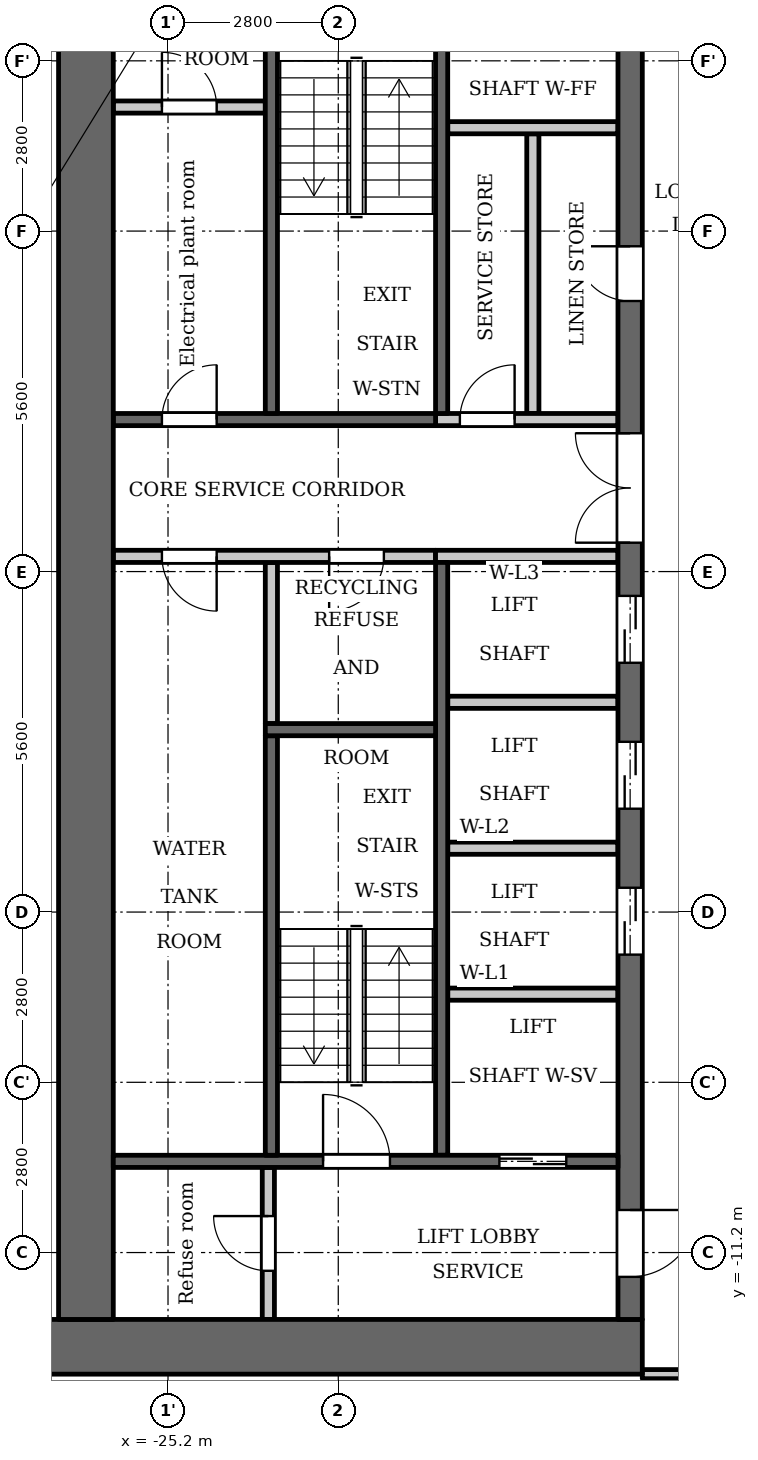
"""IFC4 building model, lengths in metres.
Left out: names, types, materials, properties, quantities, classifications, styles, units other than length and angle.
Written with IfcOpenShell. Run it as: python <this file> out.ifc"""

import sys

from ifc_helpers import new_model, si_unit, direction, frame, frame_2d, origin, place, context, subcontext, project, spatial, rectangle, extrude, element, fill, save


model = new_model("IFC4")
c1 = context("Model", 3, precision=1e-05, world=origin(), true_north=direction((0.0, 1.0)))
c2 = subcontext(c1, "Body", "Model", "MODEL_VIEW")
j1 = project(units=[si_unit("LENGTHUNIT", "METRE"), si_unit("PLANEANGLEUNIT", "RADIAN")], contexts=[c1])
p1 = place(None, origin())
s1 = spatial("IfcSite", under=j1, at=p1, CompositionType="ELEMENT")
p2 = place(p1, origin())
s2 = spatial("IfcBuilding", under=s1, at=p2, CompositionType="ELEMENT")
p3 = place(p2, frame((0.0, 0.0, 65.5)))
s3 = spatial("IfcBuildingStorey", under=s2, at=p3, CompositionType="ELEMENT", Elevation=65.5)
p4 = place(p3, frame((-23.5, -2.5, 0.0), z_axis=(0.0, 0.0, 1.0), x_axis=(0.0, 1.0, 0.0)))
e1 = element("IfcWall", 1, at=p4, inside=s3, PredefinedType="PARTITIONING", context=c2, shape_type="SweptSolid", body=[
    extrude(rectangle(XDim=2.65, YDim=0.2, at=frame_2d((1.325, 0.0))), origin(), (0.0, 0.0, 1.0), 3.2),
])
p5 = place(p3, frame((-20.7, 2.6, 0.0), z_axis=(0.0, 0.0, 1.0), x_axis=(0.0, 1.0, 0.0)))
e2 = element("IfcWall", 2, at=p5, inside=s3, PredefinedType="SHEAR", context=c2, shape_type="SweptSolid", body=[
    extrude(rectangle(XDim=7.0, YDim=0.2, at=frame_2d((3.5, 0.0))), origin(), (0.0, 0.0, 1.0), 3.2),
])
p6 = place(p3, frame((-20.7, -9.6, 0.0), z_axis=(0.0, 0.0, 1.0), x_axis=(0.0, 1.0, 0.0)))
e3 = element("IfcWall", 3, at=p6, inside=s3, PredefinedType="SHEAR", context=c2, shape_type="SweptSolid", body=[
    extrude(rectangle(XDim=9.75, YDim=0.2, at=frame_2d((4.875, 0.0))), origin(), (0.0, 0.0, 1.0), 3.2),
])
p7 = place(p3, frame((-20.8, 2.5, 0.0), z_axis=(0.0, 0.0, 1.0), x_axis=(-1.0, 0.0, 0.0)))
e4 = element("IfcWall", 4, at=p7, inside=s3, PredefinedType="SHEAR", context=c2, shape_type="SweptSolid", body=[
    extrude(rectangle(XDim=5.3, YDim=0.2, at=frame_2d((2.65, 0.0))), origin(), (0.0, 0.0, 1.0), 3.2),
])
p8 = place(p7, frame((3.6, 0.0, 0.0)))
e5 = element("IfcOpeningElement", 5, at=p8, cuts=e4, PredefinedType="OPENING", context=c2, shape_type="SweptSolid", body=[
    extrude(rectangle(XDim=0.9, YDim=2.1, at=frame_2d((0.45, 1.05))), frame((0.0, 0.11, 0.0), z_axis=(0.0, -1.0, 0.0), x_axis=(1.0, 0.0, 0.0)), (0.0, 0.0, 1.0), 0.22),
])
p9 = place(p3, frame((-20.8, 0.25, 0.0), z_axis=(0.0, 0.0, 1.0), x_axis=(-1.0, 0.0, 0.0)))
e6 = element("IfcWall", 6, at=p9, inside=s3, PredefinedType="PARTITIONING", context=c2, shape_type="SweptSolid", body=[
    extrude(rectangle(XDim=5.3, YDim=0.2, at=frame_2d((2.65, 0.0))), origin(), (0.0, 0.0, 1.0), 3.2),
])
p10 = place(p9, frame((0.85, 0.0, 0.0)))
e7 = element("IfcOpeningElement", 7, at=p10, cuts=e6, PredefinedType="OPENING", context=c2, shape_type="SweptSolid", body=[
    extrude(rectangle(XDim=0.9, YDim=2.1, at=frame_2d((0.45, 1.05))), frame((0.0, 0.11, 0.0), z_axis=(0.0, -1.0, 0.0), x_axis=(1.0, 0.0, 0.0)), (0.0, 0.0, 1.0), 0.22),
])
p11 = place(p9, frame((3.6, 0.0, 0.0)))
e8 = element("IfcOpeningElement", 8, at=p11, cuts=e6, PredefinedType="OPENING", context=c2, shape_type="SweptSolid", body=[
    extrude(rectangle(XDim=0.9, YDim=2.1, at=frame_2d((0.45, 1.05))), frame((0.0, 0.11, 0.0), z_axis=(0.0, -1.0, 0.0), x_axis=(1.0, 0.0, 0.0)), (0.0, 0.0, 1.0), 0.22),
])
p12 = place(p3, frame((-17.4, -12.75, 0.0), z_axis=(0.0, 0.0, 1.0), x_axis=(-1.0, 0.0, 0.0)))
e9 = element("IfcWall", 9, at=p12, inside=s3, PredefinedType="SHEAR", context=c2, shape_type="SweptSolid", body=[
    extrude(rectangle(XDim=10.4, YDim=0.9, at=frame_2d((5.2, 0.0))), origin(), (0.0, 0.0, 1.0), 3.2),
])
p13 = place(p3, frame((-19.2, 2.6, 0.0), z_axis=(0.0, 0.0, 1.0), x_axis=(0.0, 1.0, 0.0)))
e10 = element("IfcWall", 10, at=p13, inside=s3, PredefinedType="PARTITIONING", context=c2, shape_type="SweptSolid", body=[
    extrude(rectangle(XDim=4.6, YDim=0.2, at=frame_2d((2.3, 0.0))), origin(), (0.0, 0.0, 1.0), 3.2),
])
p14 = place(p3, frame((-17.6, -12.3, 0.0), z_axis=(0.0, 0.0, 1.0), x_axis=(0.0, 1.0, 0.0)))
e11 = element("IfcWall", 11, at=p14, inside=s3, PredefinedType="SHEAR", context=c2, shape_type="SweptSolid", body=[
    extrude(rectangle(XDim=24.6, YDim=0.4, at=frame_2d((12.3, 0.0))), origin(), (0.0, 0.0, 1.0), 3.2),
])
p15 = place(p14, frame((6.0, 0.0, 0.0)))
e12 = element("IfcOpeningElement", 12, at=p15, cuts=e11, PredefinedType="OPENING", context=c2, shape_type="SweptSolid", body=[
    extrude(rectangle(XDim=1.1, YDim=2.1, at=frame_2d((0.55, 1.05))), frame((0.0, 0.21, 0.0), z_axis=(0.0, -1.0, 0.0), x_axis=(1.0, 0.0, 0.0)), (0.0, 0.0, 1.0), 0.42),
])
p16 = place(p14, frame((8.4, 0.0, 0.0)))
e13 = element("IfcOpeningElement", 13, at=p16, cuts=e11, PredefinedType="OPENING", context=c2, shape_type="SweptSolid", body=[
    extrude(rectangle(XDim=1.1, YDim=2.1, at=frame_2d((0.55, 1.05))), frame((0.0, 0.21, 0.0), z_axis=(0.0, -1.0, 0.0), x_axis=(1.0, 0.0, 0.0)), (0.0, 0.0, 1.0), 0.42),
])
p17 = place(p14, frame((10.8, 0.0, 0.0)))
e14 = element("IfcOpeningElement", 14, at=p17, cuts=e11, PredefinedType="OPENING", context=c2, shape_type="SweptSolid", body=[
    extrude(rectangle(XDim=1.1, YDim=2.1, at=frame_2d((0.55, 1.05))), frame((0.0, 0.21, 0.0), z_axis=(0.0, -1.0, 0.0), x_axis=(1.0, 0.0, 0.0)), (0.0, 0.0, 1.0), 0.42),
])
p18 = place(p14, frame((16.75, 0.0, 0.0)))
e15 = element("IfcOpeningElement", 15, at=p18, cuts=e11, PredefinedType="OPENING", context=c2, shape_type="SweptSolid", body=[
    extrude(rectangle(XDim=0.9, YDim=2.1, at=frame_2d((0.45, 1.05))), frame((0.0, 0.21, 0.0), z_axis=(0.0, -1.0, 0.0), x_axis=(1.0, 0.0, 0.0)), (0.0, 0.0, 1.0), 0.42),
])
p19 = place(p14, frame((22.8, 0.0, 0.0)))
e16 = element("IfcOpeningElement", 16, at=p19, cuts=e11, PredefinedType="OPENING", context=c2, shape_type="SweptSolid", body=[
    extrude(rectangle(XDim=1.1, YDim=2.1, at=frame_2d((0.55, 1.05))), frame((0.0, 0.21, 0.0), z_axis=(0.0, -1.0, 0.0), x_axis=(1.0, 0.0, 0.0)), (0.0, 0.0, 1.0), 0.42),
])
p20 = place(p14, frame((0.7, 0.0, 0.0)))
e17 = element("IfcOpeningElement", 17, at=p20, cuts=e11, PredefinedType="OPENING", context=c2, shape_type="SweptSolid", body=[
    extrude(rectangle(XDim=1.1, YDim=2.1, at=frame_2d((0.55, 1.05))), frame((0.0, 0.21, 0.0), z_axis=(0.0, -1.0, 0.0), x_axis=(1.0, 0.0, 0.0)), (0.0, 0.0, 1.0), 0.42),
])
p21 = place(p14, frame((12.775, 0.0, 0.0)))
e18 = element("IfcOpeningElement", 18, at=p21, cuts=e11, PredefinedType="OPENING", context=c2, shape_type="SweptSolid", body=[
    extrude(rectangle(XDim=1.8, YDim=2.1, at=frame_2d((0.9, 1.05))), frame((0.0, 0.21, 0.0), z_axis=(0.0, -1.0, 0.0), x_axis=(1.0, 0.0, 0.0)), (0.0, 0.0, 1.0), 0.42),
])
p22 = place(p3, frame((-26.55, -12.3, 0.0), z_axis=(0.0, 0.0, 1.0), x_axis=(0.0, 1.0, 0.0)))
e19 = element("IfcWall", 19, at=p22, inside=s3, PredefinedType="SHEAR", context=c2, shape_type="SweptSolid", body=[
    extrude(rectangle(XDim=24.6, YDim=0.9, at=frame_2d((12.3, 0.0))), origin(), (0.0, 0.0, 1.0), 3.2),
])
p23 = place(p3, frame((-23.55, -12.3, 0.0), z_axis=(0.0, 0.0, 1.0), x_axis=(0.0, 1.0, 0.0)))
e20 = element("IfcWall", 20, at=p23, inside=s3, PredefinedType="PARTITIONING", context=c2, shape_type="SweptSolid", body=[
    extrude(rectangle(XDim=2.5, YDim=0.2, at=frame_2d((1.25, 0.0))), origin(), (0.0, 0.0, 1.0), 3.2),
])
p24 = place(p23, frame((0.8, 0.0, 0.0)))
e21 = element("IfcOpeningElement", 21, at=p24, cuts=e20, PredefinedType="OPENING", context=c2, shape_type="SweptSolid", body=[
    extrude(rectangle(XDim=0.9, YDim=2.1, at=frame_2d((0.45, 1.05))), frame((0.0, 0.11, 0.0), z_axis=(0.0, -1.0, 0.0), x_axis=(1.0, 0.0, 0.0)), (0.0, 0.0, 1.0), 0.22),
])
p25 = place(p3, frame((-23.6, 7.64, 0.0), z_axis=(0.0, 0.0, 1.0), x_axis=(-1.0, 0.0, 0.0)))
e22 = element("IfcWall", 22, at=p25, inside=s3, PredefinedType="PARTITIONING", context=c2, shape_type="SweptSolid", body=[
    extrude(rectangle(XDim=2.5, YDim=0.2, at=frame_2d((1.25, 0.0))), origin(), (0.0, 0.0, 1.0), 3.2),
])
p26 = place(p25, frame((0.8, 0.0, 0.0)))
e23 = element("IfcOpeningElement", 23, at=p26, cuts=e22, PredefinedType="OPENING", context=c2, shape_type="SweptSolid", body=[
    extrude(rectangle(XDim=0.9, YDim=2.1, at=frame_2d((0.45, 1.05))), frame((0.0, 0.11, 0.0), z_axis=(0.0, -1.0, 0.0), x_axis=(1.0, 0.0, 0.0)), (0.0, 0.0, 1.0), 0.22),
])
p27 = place(p3, frame((-17.8, -9.7, 0.0), z_axis=(0.0, 0.0, 1.0), x_axis=(-1.0, 0.0, 0.0)))
e24 = element("IfcWall", 24, at=p27, inside=s3, PredefinedType="SHEAR", context=c2, shape_type="SweptSolid", body=[
    extrude(rectangle(XDim=8.3, YDim=0.2, at=frame_2d((4.15, 0.0))), origin(), (0.0, 0.0, 1.0), 3.2),
])
p28 = place(p27, frame((0.85, 0.0, 0.0)))
e25 = element("IfcOpeningElement", 25, at=p28, cuts=e24, PredefinedType="OPENING", context=c2, shape_type="SweptSolid", body=[
    extrude(rectangle(XDim=1.1, YDim=2.1, at=frame_2d((0.55, 1.05))), frame((0.0, 0.11, 0.0), z_axis=(0.0, -1.0, 0.0), x_axis=(1.0, 0.0, 0.0)), (0.0, 0.0, 1.0), 0.22),
])
p29 = place(p27, frame((3.75, 0.0, 0.0)))
e26 = element("IfcOpeningElement", 26, at=p29, cuts=e24, PredefinedType="OPENING", context=c2, shape_type="SweptSolid", body=[
    extrude(rectangle(XDim=1.1, YDim=2.1, at=frame_2d((0.55, 1.05))), frame((0.0, 0.11, 0.0), z_axis=(0.0, -1.0, 0.0), x_axis=(1.0, 0.0, 0.0)), (0.0, 0.0, 1.0), 0.22),
])
for number, where, z_axis, x_axis in (
    (27, (-17.8, -6.95, 0.0), (0.0, 0.0, 1.0), (-1.0, 0.0, 0.0)),
    (28, (-17.8, -4.55, 0.0), (0.0, 0.0, 1.0), (-1.0, 0.0, 0.0)),
    (29, (-17.8, -2.15, 0.0), (0.0, 0.0, 1.0), (-1.0, 0.0, 0.0)),
):
    element("IfcWall", number, at=place(p3, frame(where, z_axis=z_axis, x_axis=x_axis)), inside=s3, PredefinedType="PARTITIONING", context=c2, shape_type="SweptSolid", body=[
        extrude(rectangle(XDim=2.8, YDim=0.2, at=frame_2d((1.4, 0.0))), origin(), (0.0, 0.0, 1.0), 3.2),
    ])
p30 = place(p3, frame((-17.8, 0.25, 0.0), z_axis=(0.0, 0.0, 1.0), x_axis=(-1.0, 0.0, 0.0)))
e30 = element("IfcWall", 30, at=p30, inside=s3, PredefinedType="PARTITIONING", context=c2, shape_type="SweptSolid", body=[
    extrude(rectangle(XDim=3.0, YDim=0.2, at=frame_2d((1.5, 0.0))), origin(), (0.0, 0.0, 1.0), 3.2),
])
p31 = place(p3, frame((-17.8, 2.5, 0.0), z_axis=(0.0, 0.0, 1.0), x_axis=(-1.0, 0.0, 0.0)))
e31 = element("IfcWall", 31, at=p31, inside=s3, PredefinedType="PARTITIONING", context=c2, shape_type="SweptSolid", body=[
    extrude(rectangle(XDim=3.0, YDim=0.2, at=frame_2d((1.5, 0.0))), origin(), (0.0, 0.0, 1.0), 3.2),
])
p32 = place(p31, frame((1.7, 0.0, 0.0)))
e32 = element("IfcOpeningElement", 32, at=p32, cuts=e31, PredefinedType="OPENING", context=c2, shape_type="SweptSolid", body=[
    extrude(rectangle(XDim=0.9, YDim=2.1, at=frame_2d((0.45, 1.05))), frame((0.0, 0.11, 0.0), z_axis=(0.0, -1.0, 0.0), x_axis=(1.0, 0.0, 0.0)), (0.0, 0.0, 1.0), 0.22),
])
p33 = place(p3, frame((-17.8, 7.3, 0.0), z_axis=(0.0, 0.0, 1.0), x_axis=(-1.0, 0.0, 0.0)))
e33 = element("IfcWall", 33, at=p33, inside=s3, PredefinedType="PARTITIONING", context=c2, shape_type="SweptSolid", body=[
    extrude(rectangle(XDim=2.8, YDim=0.2, at=frame_2d((1.4, 0.0))), origin(), (0.0, 0.0, 1.0), 3.2),
])
p34 = place(p3, frame((-23.5, 2.6, 0.0), z_axis=(0.0, 0.0, 1.0), x_axis=(0.0, 1.0, 0.0)))
e34 = element("IfcWall", 34, at=p34, inside=s3, PredefinedType="SHEAR", context=c2, shape_type="SweptSolid", body=[
    extrude(rectangle(XDim=7.0, YDim=0.2, at=frame_2d((3.5, 0.0))), origin(), (0.0, 0.0, 1.0), 3.2),
])
p35 = place(p3, frame((-23.5, -9.6, 0.0), z_axis=(0.0, 0.0, 1.0), x_axis=(0.0, 1.0, 0.0)))
e35 = element("IfcWall", 35, at=p35, inside=s3, PredefinedType="SHEAR", context=c2, shape_type="SweptSolid", body=[
    extrude(rectangle(XDim=6.9, YDim=0.2, at=frame_2d((3.45, 0.0))), origin(), (0.0, 0.0, 1.0), 3.2),
])
p36 = place(p3, frame((-20.8, -2.6, 0.0), z_axis=(0.0, 0.0, 1.0), x_axis=(-1.0, 0.0, 0.0)))
e36 = element("IfcWall", 36, at=p36, inside=s3, PredefinedType="SHEAR", context=c2, shape_type="SweptSolid", body=[
    extrude(rectangle(XDim=2.8, YDim=0.2, at=frame_2d((1.4, 0.0))), origin(), (0.0, 0.0, 1.0), 3.2),
])
p37 = place(p3, frame((-17.4, -13.2, 0.0), z_axis=(0.0, 0.0, 1.0), x_axis=(1.0, 0.0, 0.0)))
e37 = element("IfcWall", 37, at=p37, inside=s3, PredefinedType="PARTITIONING", context=c2, shape_type="SweptSolid", body=[
    extrude(rectangle(XDim=34.8, YDim=0.15, at=frame_2d((17.4, 0.0))), origin(), (0.0, 0.0, 1.0), 3.2),
])
p38 = place(p37, frame((0.65, 0.0, 0.0)))
e38 = element("IfcOpeningElement", 38, at=p38, cuts=e37, PredefinedType="OPENING", context=c2, shape_type="SweptSolid", body=[
    extrude(rectangle(XDim=1.0, YDim=2.1, at=frame_2d((0.5, 1.05))), frame((0.0, 0.085, 0.0), z_axis=(0.0, -1.0, 0.0), x_axis=(1.0, 0.0, 0.0)), (0.0, 0.0, 1.0), 0.17),
])
p39 = place(p37, frame((33.05, 0.0, 0.0)))
e39 = element("IfcOpeningElement", 39, at=p39, cuts=e37, PredefinedType="OPENING", context=c2, shape_type="SweptSolid", body=[
    extrude(rectangle(XDim=1.0, YDim=2.1, at=frame_2d((0.5, 1.05))), frame((0.0, 0.085, 0.0), z_axis=(0.0, -1.0, 0.0), x_axis=(1.0, 0.0, 0.0)), (0.0, 0.0, 1.0), 0.17),
])
p40 = place(p37, frame((4.55, 0.0, 0.0)))
e40 = element("IfcOpeningElement", 40, at=p40, cuts=e37, PredefinedType="OPENING", context=c2, shape_type="SweptSolid", body=[
    extrude(rectangle(XDim=1.0, YDim=2.1, at=frame_2d((0.5, 1.05))), frame((0.0, 0.085, 0.0), z_axis=(0.0, -1.0, 0.0), x_axis=(1.0, 0.0, 0.0)), (0.0, 0.0, 1.0), 0.17),
])
p41 = place(p37, frame((15.75, 0.0, 0.0)))
e41 = element("IfcOpeningElement", 41, at=p41, cuts=e37, PredefinedType="OPENING", context=c2, shape_type="SweptSolid", body=[
    extrude(rectangle(XDim=1.0, YDim=2.1, at=frame_2d((0.5, 1.05))), frame((0.0, 0.085, 0.0), z_axis=(0.0, -1.0, 0.0), x_axis=(1.0, 0.0, 0.0)), (0.0, 0.0, 1.0), 0.17),
])
p42 = place(p37, frame((18.1, 0.0, 0.0)))
e42 = element("IfcOpeningElement", 42, at=p42, cuts=e37, PredefinedType="OPENING", context=c2, shape_type="SweptSolid", body=[
    extrude(rectangle(XDim=1.0, YDim=2.1, at=frame_2d((0.5, 1.05))), frame((0.0, 0.085, 0.0), z_axis=(0.0, -1.0, 0.0), x_axis=(1.0, 0.0, 0.0)), (0.0, 0.0, 1.0), 0.17),
])
p43 = place(p37, frame((26.95, 0.0, 0.0)))
e43 = element("IfcOpeningElement", 43, at=p43, cuts=e37, PredefinedType="OPENING", context=c2, shape_type="SweptSolid", body=[
    extrude(rectangle(XDim=1.0, YDim=2.1, at=frame_2d((0.5, 1.05))), frame((0.0, 0.085, 0.0), z_axis=(0.0, -1.0, 0.0), x_axis=(1.0, 0.0, 0.0)), (0.0, 0.0, 1.0), 0.17),
])
p44 = place(p28, origin())
e44 = element("IfcDoor", 44, at=p44, inside=s3, OperationType="DOUBLE_DOOR_SLIDING", PredefinedType="DOOR", context=c2, shape_type="SweptSolid", body=[
    extrude(rectangle(XDim=1.1, YDim=2.1, at=frame_2d((0.55, 1.05))), frame((0.0, 0.025, 0.0), z_axis=(0.0, -1.0, 0.0), x_axis=(1.0, 0.0, 0.0)), (0.0, 0.0, 1.0), 0.05),
])
fill(e25, e44)
p45 = place(p15, origin())
e45 = element("IfcDoor", 45, at=p45, inside=s3, OperationType="DOUBLE_DOOR_SLIDING", PredefinedType="DOOR", context=c2, shape_type="SweptSolid", body=[
    extrude(rectangle(XDim=1.1, YDim=2.1, at=frame_2d((0.55, 1.05))), frame((0.0, 0.025, 0.0), z_axis=(0.0, -1.0, 0.0), x_axis=(1.0, 0.0, 0.0)), (0.0, 0.0, 1.0), 0.05),
])
fill(e12, e45)
p46 = place(p16, origin())
e46 = element("IfcDoor", 46, at=p46, inside=s3, OperationType="DOUBLE_DOOR_SLIDING", PredefinedType="DOOR", context=c2, shape_type="SweptSolid", body=[
    extrude(rectangle(XDim=1.1, YDim=2.1, at=frame_2d((0.55, 1.05))), frame((0.0, 0.025, 0.0), z_axis=(0.0, -1.0, 0.0), x_axis=(1.0, 0.0, 0.0)), (0.0, 0.0, 1.0), 0.05),
])
fill(e13, e46)
p47 = place(p17, origin())
e47 = element("IfcDoor", 47, at=p47, inside=s3, OperationType="DOUBLE_DOOR_SLIDING", PredefinedType="DOOR", context=c2, shape_type="SweptSolid", body=[
    extrude(rectangle(XDim=1.1, YDim=2.1, at=frame_2d((0.55, 1.05))), frame((0.0, 0.025, 0.0), z_axis=(0.0, -1.0, 0.0), x_axis=(1.0, 0.0, 0.0)), (0.0, 0.0, 1.0), 0.05),
])
fill(e14, e47)
p48 = place(p18, origin())
e48 = element("IfcDoor", 48, at=p48, inside=s3, OperationType="SINGLE_SWING_LEFT", PredefinedType="DOOR", context=c2, shape_type="SweptSolid", body=[
    extrude(rectangle(XDim=0.9, YDim=2.1, at=frame_2d((0.45, 1.05))), frame((0.0, 0.025, 0.0), z_axis=(0.0, -1.0, 0.0), x_axis=(1.0, 0.0, 0.0)), (0.0, 0.0, 1.0), 0.05),
])
fill(e15, e48)
p49 = place(p32, origin())
e49 = element("IfcDoor", 49, at=p49, inside=s3, OperationType="SINGLE_SWING_LEFT", PredefinedType="DOOR", context=c2, shape_type="SweptSolid", body=[
    extrude(rectangle(XDim=0.9, YDim=2.1, at=frame_2d((0.45, 1.05))), frame((0.0, 0.025, 0.0), z_axis=(0.0, -1.0, 0.0), x_axis=(1.0, 0.0, 0.0)), (0.0, 0.0, 1.0), 0.05),
])
fill(e32, e49)
p50 = place(p20, origin())
e50 = element("IfcDoor", 50, at=p50, inside=s3, OperationType="SINGLE_SWING_RIGHT", PredefinedType="DOOR", context=c2, shape_type="SweptSolid", body=[
    extrude(rectangle(XDim=1.1, YDim=2.1, at=frame_2d((0.55, 1.05))), frame((0.0, 0.025, 0.0), z_axis=(0.0, -1.0, 0.0), x_axis=(1.0, 0.0, 0.0)), (0.0, 0.0, 1.0), 0.05),
])
fill(e17, e50)
p51 = place(p24, origin())
e51 = element("IfcDoor", 51, at=p51, inside=s3, OperationType="SINGLE_SWING_LEFT", PredefinedType="DOOR", context=c2, shape_type="SweptSolid", body=[
    extrude(rectangle(XDim=0.9, YDim=2.1, at=frame_2d((0.45, 1.05))), frame((0.0, 0.025, 0.0), z_axis=(0.0, -1.0, 0.0), x_axis=(1.0, 0.0, 0.0)), (0.0, 0.0, 1.0), 0.05),
])
fill(e21, e51)
p52 = place(p29, origin())
e52 = element("IfcDoor", 52, at=p52, inside=s3, OperationType="SINGLE_SWING_RIGHT", PredefinedType="DOOR", context=c2, shape_type="SweptSolid", body=[
    extrude(rectangle(XDim=1.1, YDim=2.1, at=frame_2d((0.55, 1.05))), frame((0.0, 0.025, 0.0), z_axis=(0.0, -1.0, 0.0), x_axis=(1.0, 0.0, 0.0)), (0.0, 0.0, 1.0), 0.05),
])
fill(e26, e52)
p53 = place(p21, origin())
e53 = element("IfcDoor", 53, at=p53, inside=s3, OperationType="DOUBLE_DOOR_SINGLE_SWING", PredefinedType="DOOR", context=c2, shape_type="SweptSolid", body=[
    extrude(rectangle(XDim=1.8, YDim=2.1, at=frame_2d((0.9, 1.05))), frame((0.0, 0.025, 0.0), z_axis=(0.0, -1.0, 0.0), x_axis=(1.0, 0.0, 0.0)), (0.0, 0.0, 1.0), 0.05),
])
fill(e18, e53)
p54 = place(p10, origin())
e54 = element("IfcDoor", 54, at=p54, inside=s3, OperationType="SINGLE_SWING_LEFT", PredefinedType="DOOR", context=c2, shape_type="SweptSolid", body=[
    extrude(rectangle(XDim=0.9, YDim=2.1, at=frame_2d((0.45, 1.05))), frame((0.0, 0.025, 0.0), z_axis=(0.0, -1.0, 0.0), x_axis=(1.0, 0.0, 0.0)), (0.0, 0.0, 1.0), 0.05),
])
fill(e7, e54)
p55 = place(p11, origin())
e55 = element("IfcDoor", 55, at=p55, inside=s3, OperationType="SINGLE_SWING_RIGHT", PredefinedType="DOOR", context=c2, shape_type="SweptSolid", body=[
    extrude(rectangle(XDim=0.9, YDim=2.1, at=frame_2d((0.45, 1.05))), frame((0.0, 0.025, 0.0), z_axis=(0.0, -1.0, 0.0), x_axis=(1.0, 0.0, 0.0)), (0.0, 0.0, 1.0), 0.05),
])
fill(e8, e55)
p56 = place(p26, origin())
e56 = element("IfcDoor", 56, at=p56, inside=s3, OperationType="SINGLE_SWING_RIGHT", PredefinedType="DOOR", context=c2, shape_type="SweptSolid", body=[
    extrude(rectangle(XDim=0.9, YDim=2.1, at=frame_2d((0.45, 1.05))), frame((0.0, 0.025, 0.0), z_axis=(0.0, -1.0, 0.0), x_axis=(1.0, 0.0, 0.0)), (0.0, 0.0, 1.0), 0.05),
])
fill(e23, e56)
p57 = place(p8, origin())
e57 = element("IfcDoor", 57, at=p57, inside=s3, OperationType="SINGLE_SWING_LEFT", PredefinedType="DOOR", context=c2, shape_type="SweptSolid", body=[
    extrude(rectangle(XDim=0.9, YDim=2.1, at=frame_2d((0.45, 1.05))), frame((0.0, 0.025, 0.0), z_axis=(0.0, -1.0, 0.0), x_axis=(1.0, 0.0, 0.0)), (0.0, 0.0, 1.0), 0.05),
])
fill(e5, e57)
save(model, sys.argv[1])
